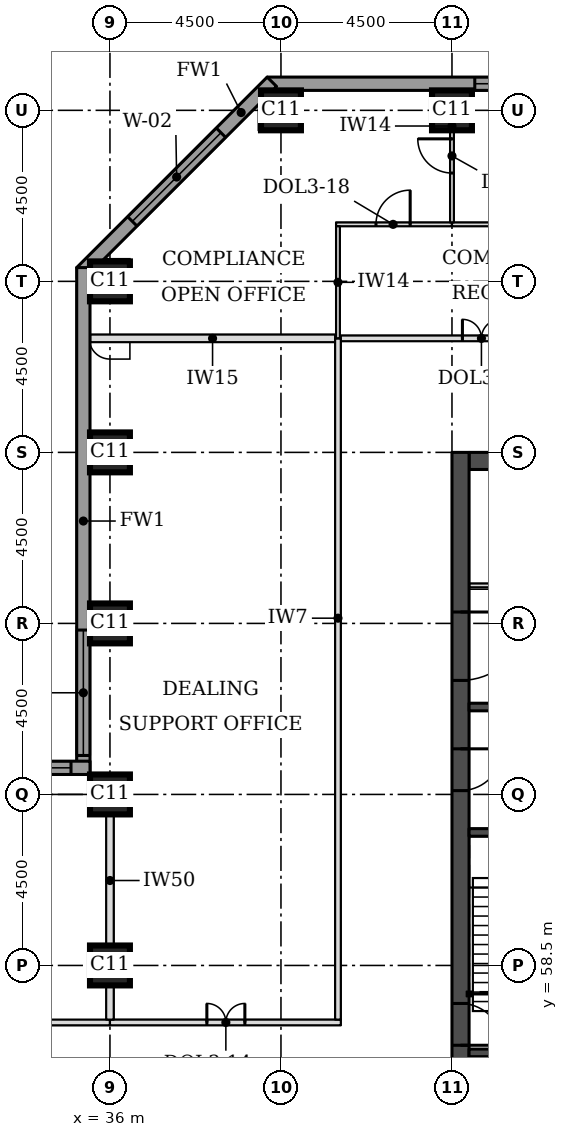
"""IFC4 building model, lengths in metres.
Left out: names, types, materials, properties, quantities, classifications, styles, units other than length and angle.
Written with IfcOpenShell. Run it as: python <this file> out.ifc"""

import sys

from ifc_helpers import new_model, si_unit, direction, frame, frame_2d, origin, origin_2d, place, context, subcontext, project, spatial, rectangle, extrude, element, fill, save


model = new_model("IFC4")
c1 = context("Model", 3, precision=1e-05, world=origin(), true_north=direction((0.0, 1.0)))
c2 = subcontext(c1, "Body", "Model", "MODEL_VIEW")
j1 = project(units=[si_unit("LENGTHUNIT", "METRE"), si_unit("PLANEANGLEUNIT", "RADIAN")], contexts=[c1])
p1 = place(None, origin())
s1 = spatial("IfcSite", under=j1, at=p1, CompositionType="ELEMENT")
p2 = place(p1, origin())
s2 = spatial("IfcBuilding", under=s1, at=p2, CompositionType="ELEMENT")
p3 = place(p2, frame((0.0, 0.0, 97.4)))
s3 = spatial("IfcBuildingStorey", under=s2, at=p3, CompositionType="ELEMENT", Elevation=97.4)
for number, where, z_axis, x_axis in (
    (1, (36.0, 58.5, 0.0), (0.0, 0.0, 1.0), (1.0, 0.0, 0.0)),
    (2, (36.0, 63.0, 0.0), (0.0, 0.0, 1.0), (1.0, 0.0, 0.0)),
    (3, (36.0, 67.5, 0.0), (0.0, 0.0, 1.0), (1.0, 0.0, 0.0)),
    (4, (36.0, 72.0, 0.0), (0.0, 0.0, 1.0), (1.0, 0.0, 0.0)),
    (5, (36.0, 76.5, 0.0), (0.0, 0.0, 1.0), (1.0, 0.0, 0.0)),
    (6, (40.5, 81.0, 0.0), (0.0, 0.0, 1.0), (1.0, 0.0, 0.0)),
    (7, (45.0, 81.0, 0.0), (0.0, 0.0, 1.0), (1.0, 0.0, 0.0)),
):
    element("IfcColumn", number, at=place(p3, frame(where, z_axis=z_axis, x_axis=x_axis)), inside=s3, PredefinedType="COLUMN", context=c2, shape_type="SweptSolid", body=[
        extrude(rectangle(XDim=1.05, YDim=1.05, at=origin_2d()), origin(), (0.0, 0.0, 1.0), 3.7),
    ])
p4 = place(p3, frame((45.45, 71.775, 0.0), z_axis=(0.0, 0.0, 1.0), x_axis=(1.0, 0.0, 0.0)))
e8 = element("IfcWall", 8, at=p4, inside=s3, PredefinedType="SHEAR", context=c2, shape_type="SweptSolid", body=[
    extrude(rectangle(XDim=21.6, YDim=0.45, at=frame_2d((10.8, 0.0))), origin(), (0.0, 0.0, 1.0), 3.7),
])
p5 = place(p3, frame((45.225, 49.5, 0.0), z_axis=(0.0, 0.0, 1.0), x_axis=(0.0, 1.0, 0.0)))
e9 = element("IfcWall", 9, at=p5, inside=s3, PredefinedType="SHEAR", context=c2, shape_type="SweptSolid", body=[
    extrude(rectangle(XDim=22.5, YDim=0.45, at=frame_2d((11.25, 0.0))), origin(), (0.0, 0.0, 1.0), 3.7),
])
p6 = place(p5, frame((4.2, 0.0, 0.0)))
e10 = element("IfcOpeningElement", 10, at=p6, cuts=e9, PredefinedType="OPENING", context=c2, shape_type="SweptSolid", body=[
    extrude(rectangle(XDim=1.8, YDim=2.1, at=frame_2d((0.9, 1.05))), frame((0.0, 0.235, 0.0), z_axis=(0.0, -1.0, 0.0), x_axis=(1.0, 0.0, 0.0)), (0.0, 0.0, 1.0), 0.47),
])
p7 = place(p5, frame((6.9, 0.0, 0.0)))
e11 = element("IfcOpeningElement", 11, at=p7, cuts=e9, PredefinedType="OPENING", context=c2, shape_type="SweptSolid", body=[
    extrude(rectangle(XDim=1.1, YDim=2.1, at=frame_2d((0.55, 1.05))), frame((0.0, 0.235, 0.0), z_axis=(0.0, -1.0, 0.0), x_axis=(1.0, 0.0, 0.0)), (0.0, 0.0, 1.0), 0.47),
])
p8 = place(p5, frame((13.6, 0.0, 0.0)))
e12 = element("IfcOpeningElement", 12, at=p8, cuts=e9, PredefinedType="OPENING", context=c2, shape_type="SweptSolid", body=[
    extrude(rectangle(XDim=1.1, YDim=2.1, at=frame_2d((0.55, 1.05))), frame((0.0, 0.235, 0.0), z_axis=(0.0, -1.0, 0.0), x_axis=(1.0, 0.0, 0.0)), (0.0, 0.0, 1.0), 0.47),
])
p9 = place(p5, frame((16.5, 0.0, 0.0)))
e13 = element("IfcOpeningElement", 13, at=p9, cuts=e9, PredefinedType="OPENING", context=c2, shape_type="SweptSolid", body=[
    extrude(rectangle(XDim=1.8, YDim=2.1, at=frame_2d((0.9, 1.05))), frame((0.0, 0.235, 0.0), z_axis=(0.0, -1.0, 0.0), x_axis=(1.0, 0.0, 0.0)), (0.0, 0.0, 1.0), 0.47),
])
p10 = place(p3, frame((72.362, 81.7, 0.0), z_axis=(0.0, 0.0, 1.0), x_axis=(-1.0, 0.0, 0.0)))
e14 = element("IfcWall", 14, at=p10, inside=s3, PredefinedType="STANDARD", context=c2, shape_type="SweptSolid", body=[
    extrude(rectangle(XDim=32.225, YDim=0.35, at=frame_2d((16.112, 0.0))), origin(), (0.0, 0.0, 1.0), 3.525),
])
p11 = place(p10, frame((5.462, 0.0, 0.9)))
e15 = element("IfcOpeningElement", 15, at=p11, cuts=e14, PredefinedType="OPENING", context=c2, shape_type="SweptSolid", body=[
    extrude(rectangle(XDim=3.3, YDim=1.9, at=frame_2d((1.65, 0.95))), frame((0.0, 0.185, 0.0), z_axis=(0.0, -1.0, 0.0), x_axis=(1.0, 0.0, 0.0)), (0.0, 0.0, 1.0), 0.37),
])
p12 = place(p10, frame((9.962, 0.0, 0.9)))
e16 = element("IfcOpeningElement", 16, at=p12, cuts=e14, PredefinedType="OPENING", context=c2, shape_type="SweptSolid", body=[
    extrude(rectangle(XDim=3.3, YDim=1.9, at=frame_2d((1.65, 0.95))), frame((0.0, 0.185, 0.0), z_axis=(0.0, -1.0, 0.0), x_axis=(1.0, 0.0, 0.0)), (0.0, 0.0, 1.0), 0.37),
])
p13 = place(p10, frame((14.462, 0.0, 0.9)))
e17 = element("IfcOpeningElement", 17, at=p13, cuts=e14, PredefinedType="OPENING", context=c2, shape_type="SweptSolid", body=[
    extrude(rectangle(XDim=3.3, YDim=1.9, at=frame_2d((1.65, 0.95))), frame((0.0, 0.185, 0.0), z_axis=(0.0, -1.0, 0.0), x_axis=(1.0, 0.0, 0.0)), (0.0, 0.0, 1.0), 0.37),
])
p14 = place(p10, frame((18.962, 0.0, 0.9)))
e18 = element("IfcOpeningElement", 18, at=p14, cuts=e14, PredefinedType="OPENING", context=c2, shape_type="SweptSolid", body=[
    extrude(rectangle(XDim=3.3, YDim=1.9, at=frame_2d((1.65, 0.95))), frame((0.0, 0.185, 0.0), z_axis=(0.0, -1.0, 0.0), x_axis=(1.0, 0.0, 0.0)), (0.0, 0.0, 1.0), 0.37),
])
p15 = place(p10, frame((23.462, 0.0, 0.9)))
e19 = element("IfcOpeningElement", 19, at=p15, cuts=e14, PredefinedType="OPENING", context=c2, shape_type="SweptSolid", body=[
    extrude(rectangle(XDim=3.3, YDim=1.9, at=frame_2d((1.65, 0.95))), frame((0.0, 0.185, 0.0), z_axis=(0.0, -1.0, 0.0), x_axis=(1.0, 0.0, 0.0)), (0.0, 0.0, 1.0), 0.37),
])
p16 = place(p3, frame((40.261, 81.751, 0.0), z_axis=(0.0, 0.0, 1.0), x_axis=(-0.707106781187, -0.707106781187, 0.0)))
e20 = element("IfcWall", 20, at=p16, inside=s3, PredefinedType="STANDARD", context=c2, shape_type="SweptSolid", body=[
    extrude(rectangle(XDim=7.089, YDim=0.35, at=frame_2d((3.544, 0.0))), origin(), (0.0, 0.0, 1.0), 3.525),
])
p17 = place(p16, frame((1.894, 0.0, 0.9)))
e21 = element("IfcOpeningElement", 21, at=p17, cuts=e20, PredefinedType="OPENING", context=c2, shape_type="SweptSolid", body=[
    extrude(rectangle(XDim=3.3, YDim=1.9, at=frame_2d((1.65, 0.95))), frame((0.0, 0.185, 0.0), z_axis=(0.0, -1.0, 0.0), x_axis=(1.0, 0.0, 0.0)), (0.0, 0.0, 1.0), 0.37),
])
p18 = place(p3, frame((35.3, 76.862, 0.0), z_axis=(0.0, 0.0, 1.0), x_axis=(0.0, -1.0, 0.0)))
e22 = element("IfcWall", 22, at=p18, inside=s3, PredefinedType="STANDARD", context=c2, shape_type="SweptSolid", body=[
    extrude(rectangle(XDim=13.337, YDim=0.35, at=frame_2d((6.669, 0.0))), origin(), (0.0, 0.0, 1.0), 3.525),
])
p19 = place(p18, frame((9.537, 0.0, 0.9)))
e23 = element("IfcOpeningElement", 23, at=p19, cuts=e22, PredefinedType="OPENING", context=c2, shape_type="SweptSolid", body=[
    extrude(rectangle(XDim=3.3, YDim=1.9, at=frame_2d((1.65, 0.95))), frame((0.0, 0.185, 0.0), z_axis=(0.0, -1.0, 0.0), x_axis=(1.0, 0.0, 0.0)), (0.0, 0.0, 1.0), 0.37),
])
p20 = place(p3, frame((35.475, 63.7, 0.0), z_axis=(0.0, 0.0, 1.0), x_axis=(-1.0, 0.0, 0.0)))
e24 = element("IfcWall", 24, at=p20, inside=s3, PredefinedType="STANDARD", context=c2, shape_type="SweptSolid", body=[
    extrude(rectangle(XDim=17.837, YDim=0.35, at=frame_2d((8.919, 0.0))), origin(), (0.0, 0.0, 1.0), 3.525),
])
p21 = place(p20, frame((0.5, 0.0, 0.9)))
e25 = element("IfcOpeningElement", 25, at=p21, cuts=e24, PredefinedType="OPENING", context=c2, shape_type="SweptSolid", body=[
    extrude(rectangle(XDim=3.3, YDim=1.9, at=frame_2d((1.65, 0.95))), frame((0.0, 0.185, 0.0), z_axis=(0.0, -1.0, 0.0), x_axis=(1.0, 0.0, 0.0)), (0.0, 0.0, 1.0), 0.37),
])
p22 = place(p20, frame((9.075, 0.0, 0.9)))
e26 = element("IfcOpeningElement", 26, at=p22, cuts=e24, PredefinedType="OPENING", context=c2, shape_type="SweptSolid", body=[
    extrude(rectangle(XDim=3.3, YDim=1.9, at=frame_2d((1.65, 0.95))), frame((0.0, 0.185, 0.0), z_axis=(0.0, -1.0, 0.0), x_axis=(1.0, 0.0, 0.0)), (0.0, 0.0, 1.0), 0.37),
])
p23 = place(p3, frame((29.38, 57.0, 0.0), z_axis=(0.0, 0.0, 1.0), x_axis=(1.0, 0.0, 0.0)))
e27 = element("IfcWall", 27, at=p23, inside=s3, PredefinedType="PARTITIONING", context=c2, shape_type="SweptSolid", body=[
    extrude(rectangle(XDim=6.62, YDim=0.15, at=frame_2d((3.31, 0.0))), origin(), (0.0, 0.0, 1.0), 3.55),
])
p24 = place(p23, frame((2.88, 0.0, 0.0)))
e28 = element("IfcOpeningElement", 28, at=p24, cuts=e27, PredefinedType="OPENING", context=c2, shape_type="SweptSolid", body=[
    extrude(rectangle(XDim=1.0, YDim=2.1, at=frame_2d((0.5, 1.05))), frame((0.0, 0.085, 0.0), z_axis=(0.0, -1.0, 0.0), x_axis=(1.0, 0.0, 0.0)), (0.0, 0.0, 1.0), 0.17),
])
p25 = place(p3, frame((36.0, 57.0, 0.0), z_axis=(0.0, 0.0, 1.0), x_axis=(1.0, 0.0, 0.0)))
e29 = element("IfcWall", 29, at=p25, inside=s3, PredefinedType="PARTITIONING", context=c2, shape_type="SweptSolid", body=[
    extrude(rectangle(XDim=6.075, YDim=0.15, at=frame_2d((3.038, 0.0))), origin(), (0.0, 0.0, 1.0), 3.55),
])
p26 = place(p25, frame((2.55, 0.0, 0.0)))
e30 = element("IfcOpeningElement", 30, at=p26, cuts=e29, PredefinedType="OPENING", context=c2, shape_type="SweptSolid", body=[
    extrude(rectangle(XDim=1.0, YDim=2.1, at=frame_2d((0.5, 1.05))), frame((0.0, 0.085, 0.0), z_axis=(0.0, -1.0, 0.0), x_axis=(1.0, 0.0, 0.0)), (0.0, 0.0, 1.0), 0.17),
])
p27 = place(p3, frame((35.475, 75.0, 0.0), z_axis=(0.0, 0.0, 1.0), x_axis=(1.0, 0.0, 0.0)))
e31 = element("IfcWall", 31, at=p27, inside=s3, PredefinedType="PARTITIONING", context=c2, shape_type="SweptSolid", body=[
    extrude(rectangle(XDim=6.45, YDim=0.2, at=frame_2d((3.225, 0.0))), origin(), (0.0, 0.0, 1.0), 3.55),
])
p28 = place(p3, frame((42.075, 75.0, 0.0), z_axis=(0.0, 0.0, 1.0), x_axis=(1.0, 0.0, 0.0)))
e32 = element("IfcWall", 32, at=p28, inside=s3, PredefinedType="PARTITIONING", context=c2, shape_type="SweptSolid", body=[
    extrude(rectangle(XDim=7.425, YDim=0.15, at=frame_2d((3.712, 0.0))), origin(), (0.0, 0.0, 1.0), 3.55),
])
p29 = place(p28, frame((3.2, 0.0, 0.0)))
e33 = element("IfcOpeningElement", 33, at=p29, cuts=e32, PredefinedType="OPENING", context=c2, shape_type="SweptSolid", body=[
    extrude(rectangle(XDim=1.0, YDim=2.1, at=frame_2d((0.5, 1.05))), frame((0.0, 0.085, 0.0), z_axis=(0.0, -1.0, 0.0), x_axis=(1.0, 0.0, 0.0)), (0.0, 0.0, 1.0), 0.17),
])
p30 = place(p3, frame((41.95, 78.0, 0.0), z_axis=(0.0, 0.0, 1.0), x_axis=(1.0, 0.0, 0.0)))
e34 = element("IfcWall", 34, at=p30, inside=s3, PredefinedType="PARTITIONING", context=c2, shape_type="SweptSolid", body=[
    extrude(rectangle(XDim=3.05, YDim=0.1, at=frame_2d((1.525, 0.0))), origin(), (0.0, 0.0, 1.0), 3.55),
])
p31 = place(p30, frame((1.05, 0.0, 0.0)))
e35 = element("IfcOpeningElement", 35, at=p31, cuts=e34, PredefinedType="OPENING", context=c2, shape_type="SweptSolid", body=[
    extrude(rectangle(XDim=0.9, YDim=2.1, at=frame_2d((0.45, 1.05))), frame((0.0, 0.06, 0.0), z_axis=(0.0, -1.0, 0.0), x_axis=(1.0, 0.0, 0.0)), (0.0, 0.0, 1.0), 0.12),
])
p32 = place(p3, frame((45.0, 78.0, 0.0), z_axis=(0.0, 0.0, 1.0), x_axis=(1.0, 0.0, 0.0)))
e36 = element("IfcWall", 36, at=p32, inside=s3, PredefinedType="PARTITIONING", context=c2, shape_type="SweptSolid", body=[
    extrude(rectangle(XDim=4.4, YDim=0.1, at=frame_2d((2.2, 0.0))), origin(), (0.0, 0.0, 1.0), 3.55),
])
p33 = place(p3, frame((36.0, 57.075, 0.0), z_axis=(0.0, 0.0, 1.0), x_axis=(0.0, 1.0, 0.0)))
e37 = element("IfcWall", 37, at=p33, inside=s3, PredefinedType="PARTITIONING", context=c2, shape_type="SweptSolid", body=[
    extrude(rectangle(XDim=0.9, YDim=0.2, at=frame_2d((0.45, 0.0))), origin(), (0.0, 0.0, 1.0), 2.8),
])
p34 = place(p3, frame((42.0, 57.075, 0.0), z_axis=(0.0, 0.0, 1.0), x_axis=(0.0, 1.0, 0.0)))
e38 = element("IfcWall", 38, at=p34, inside=s3, PredefinedType="PARTITIONING", context=c2, shape_type="SweptSolid", body=[
    extrude(rectangle(XDim=17.925, YDim=0.15, at=frame_2d((8.962, 0.0))), origin(), (0.0, 0.0, 1.0), 3.55),
])
p35 = place(p3, frame((36.0, 58.995, 0.0), z_axis=(0.0, 0.0, 1.0), x_axis=(0.0, 1.0, 0.0)))
e39 = element("IfcWall", 39, at=p35, inside=s3, PredefinedType="PARTITIONING", context=c2, shape_type="SweptSolid", body=[
    extrude(rectangle(XDim=3.48, YDim=0.2, at=frame_2d((1.74, 0.0))), origin(), (0.0, 0.0, 1.0), 2.8),
])
p36 = place(p3, frame((42.0, 75.0, 0.0), z_axis=(0.0, 0.0, 1.0), x_axis=(0.0, 1.0, 0.0)))
e40 = element("IfcWall", 40, at=p36, inside=s3, PredefinedType="PARTITIONING", context=c2, shape_type="SweptSolid", body=[
    extrude(rectangle(XDim=2.95, YDim=0.1, at=frame_2d((1.475, 0.0))), origin(), (0.0, 0.0, 1.0), 3.55),
])
p37 = place(p3, frame((45.0, 78.05, 0.0), z_axis=(0.0, 0.0, 1.0), x_axis=(0.0, 1.0, 0.0)))
e41 = element("IfcWall", 41, at=p37, inside=s3, PredefinedType="PARTITIONING", context=c2, shape_type="SweptSolid", body=[
    extrude(rectangle(XDim=3.475, YDim=0.1, at=frame_2d((1.737, 0.0))), origin(), (0.0, 0.0, 1.0), 3.55),
])
p38 = place(p37, frame((1.3, 0.0, 0.0)))
e42 = element("IfcOpeningElement", 42, at=p38, cuts=e41, PredefinedType="OPENING", context=c2, shape_type="SweptSolid", body=[
    extrude(rectangle(XDim=0.9, YDim=2.1, at=frame_2d((0.45, 1.05))), frame((0.0, 0.06, 0.0), z_axis=(0.0, -1.0, 0.0), x_axis=(1.0, 0.0, 0.0)), (0.0, 0.0, 1.0), 0.12),
])
p39 = place(p3, frame((45.45, 56.2, 0.0), z_axis=(0.0, 0.0, 1.0), x_axis=(1.0, 0.0, 0.0)))
e43 = element("IfcWall", 43, at=p39, inside=s3, PredefinedType="SOLIDWALL", context=c2, shape_type="SweptSolid", body=[
    extrude(rectangle(XDim=3.15, YDim=0.2, at=frame_2d((1.575, 0.0))), origin(), (0.0, 0.0, 1.0), 3.55),
])
p40 = place(p3, frame((45.45, 62.0, 0.0), z_axis=(0.0, 0.0, 1.0), x_axis=(1.0, 0.0, 0.0)))
e44 = element("IfcWall", 44, at=p40, inside=s3, PredefinedType="SOLIDWALL", context=c2, shape_type="SweptSolid", body=[
    extrude(rectangle(XDim=5.2, YDim=0.2, at=frame_2d((2.6, 0.0))), origin(), (0.0, 0.0, 1.0), 3.55),
])
p41 = place(p3, frame((45.45, 65.3, 0.0), z_axis=(0.0, 0.0, 1.0), x_axis=(1.0, 0.0, 0.0)))
e45 = element("IfcWall", 45, at=p41, inside=s3, PredefinedType="SOLIDWALL", context=c2, shape_type="SweptSolid", body=[
    extrude(rectangle(XDim=2.35, YDim=0.2, at=frame_2d((1.175, 0.0))), origin(), (0.0, 0.0, 1.0), 3.55),
])
p42 = place(p3, frame((45.45, 68.5, 0.0), z_axis=(0.0, 0.0, 1.0), x_axis=(1.0, 0.0, 0.0)))
e46 = element("IfcWall", 46, at=p42, inside=s3, PredefinedType="PARTITIONING", context=c2, shape_type="SweptSolid", body=[
    extrude(rectangle(XDim=5.2, YDim=0.1, at=frame_2d((2.6, 0.0))), origin(), (0.0, 0.0, 1.0), 3.55),
])
p43 = place(p42, frame((0.59, 0.0, 0.0)))
e47 = element("IfcOpeningElement", 47, at=p43, cuts=e46, PredefinedType="OPENING", context=c2, shape_type="SweptSolid", body=[
    extrude(rectangle(XDim=0.9, YDim=2.1, at=frame_2d((0.45, 1.05))), frame((0.0, 0.06, 0.0), z_axis=(0.0, -1.0, 0.0), x_axis=(1.0, 0.0, 0.0)), (0.0, 0.0, 1.0), 0.12),
])
p44 = place(p42, frame((3.19, 0.0, 0.0)))
e48 = element("IfcOpeningElement", 48, at=p44, cuts=e46, PredefinedType="OPENING", context=c2, shape_type="SweptSolid", body=[
    extrude(rectangle(XDim=0.9, YDim=2.1, at=frame_2d((0.45, 1.05))), frame((0.0, 0.06, 0.0), z_axis=(0.0, -1.0, 0.0), x_axis=(1.0, 0.0, 0.0)), (0.0, 0.0, 1.0), 0.12),
])
p45 = place(p15, origin())
e49 = element("IfcWindow", 49, at=p45, inside=s3, PartitioningType="SINGLE_PANEL", PredefinedType="WINDOW", context=c2, shape_type="SweptSolid", body=[
    extrude(rectangle(XDim=3.3, YDim=1.9, at=frame_2d((1.65, 0.95))), frame((0.0, 0.085, 0.0), z_axis=(0.0, -1.0, 0.0), x_axis=(1.0, 0.0, 0.0)), (0.0, 0.0, 1.0), 0.06),
])
fill(e19, e49)
p46 = place(p17, origin())
e50 = element("IfcWindow", 50, at=p46, inside=s3, PartitioningType="SINGLE_PANEL", PredefinedType="WINDOW", context=c2, shape_type="SweptSolid", body=[
    extrude(rectangle(XDim=3.3, YDim=1.9, at=frame_2d((1.65, 0.95))), frame((0.0, 0.085, 0.0), z_axis=(0.0, -1.0, 0.0), x_axis=(1.0, 0.0, 0.0)), (0.0, 0.0, 1.0), 0.06),
])
fill(e21, e50)
p47 = place(p19, origin())
e51 = element("IfcWindow", 51, at=p47, inside=s3, PartitioningType="SINGLE_PANEL", PredefinedType="WINDOW", context=c2, shape_type="SweptSolid", body=[
    extrude(rectangle(XDim=3.3, YDim=1.9, at=frame_2d((1.65, 0.95))), frame((0.0, 0.085, 0.0), z_axis=(0.0, -1.0, 0.0), x_axis=(1.0, 0.0, 0.0)), (0.0, 0.0, 1.0), 0.06),
])
fill(e23, e51)
p48 = place(p21, origin())
e52 = element("IfcWindow", 52, at=p48, inside=s3, PartitioningType="SINGLE_PANEL", PredefinedType="WINDOW", context=c2, shape_type="SweptSolid", body=[
    extrude(rectangle(XDim=3.3, YDim=1.9, at=frame_2d((1.65, 0.95))), frame((0.0, 0.085, 0.0), z_axis=(0.0, -1.0, 0.0), x_axis=(1.0, 0.0, 0.0)), (0.0, 0.0, 1.0), 0.06),
])
fill(e25, e52)
p49 = place(p29, origin())
e53 = element("IfcDoor", 53, at=p49, inside=s3, OperationType="DOUBLE_DOOR_SINGLE_SWING", PredefinedType="DOOR", context=c2, shape_type="SweptSolid", body=[
    extrude(rectangle(XDim=1.0, YDim=2.1, at=frame_2d((0.5, 1.05))), frame((0.0, 0.025, 0.0), z_axis=(0.0, -1.0, 0.0), x_axis=(1.0, 0.0, 0.0)), (0.0, 0.0, 1.0), 0.05),
])
fill(e33, e53)
p50 = place(p31, origin())
e54 = element("IfcDoor", 54, at=p50, inside=s3, OperationType="SINGLE_SWING_RIGHT", PredefinedType="DOOR", context=c2, shape_type="SweptSolid", body=[
    extrude(rectangle(XDim=0.9, YDim=2.1, at=frame_2d((0.45, 1.05))), frame((0.0, 0.025, 0.0), z_axis=(0.0, -1.0, 0.0), x_axis=(1.0, 0.0, 0.0)), (0.0, 0.0, 1.0), 0.05),
])
fill(e35, e54)
p51 = place(p38, origin())
e55 = element("IfcDoor", 55, at=p51, inside=s3, OperationType="SINGLE_SWING_RIGHT", PredefinedType="DOOR", context=c2, shape_type="SweptSolid", body=[
    extrude(rectangle(XDim=0.9, YDim=2.1, at=frame_2d((0.45, 1.05))), frame((0.0, 0.025, 0.0), z_axis=(0.0, -1.0, 0.0), x_axis=(1.0, 0.0, 0.0)), (0.0, 0.0, 1.0), 0.05),
])
fill(e42, e55)
p52 = place(p26, origin())
e56 = element("IfcDoor", 56, at=p52, inside=s3, OperationType="DOUBLE_DOOR_SINGLE_SWING", PredefinedType="DOOR", context=c2, shape_type="SweptSolid", body=[
    extrude(rectangle(XDim=1.0, YDim=2.1, at=frame_2d((0.5, 1.05))), frame((0.0, 0.025, 0.0), z_axis=(0.0, -1.0, 0.0), x_axis=(1.0, 0.0, 0.0)), (0.0, 0.0, 1.0), 0.05),
])
fill(e30, e56)
p53 = place(p7, frame((1.1, 0.0, 0.0), z_axis=(0.0, 0.0, 1.0), x_axis=(-1.0, 0.0, 0.0)))
e57 = element("IfcDoor", 57, at=p53, inside=s3, OperationType="SINGLE_SWING_RIGHT", PredefinedType="DOOR", context=c2, shape_type="SweptSolid", body=[
    extrude(rectangle(XDim=1.1, YDim=2.1, at=frame_2d((0.55, 1.05))), frame((0.0, 0.025, 0.0), z_axis=(0.0, -1.0, 0.0), x_axis=(1.0, 0.0, 0.0)), (0.0, 0.0, 1.0), 0.05),
])
fill(e11, e57)
p54 = place(p8, frame((1.1, 0.0, 0.0), z_axis=(0.0, 0.0, 1.0), x_axis=(-1.0, 0.0, 0.0)))
e58 = element("IfcDoor", 58, at=p54, inside=s3, OperationType="SINGLE_SWING_LEFT", PredefinedType="DOOR", context=c2, shape_type="SweptSolid", body=[
    extrude(rectangle(XDim=1.1, YDim=2.1, at=frame_2d((0.55, 1.05))), frame((0.0, 0.025, 0.0), z_axis=(0.0, -1.0, 0.0), x_axis=(1.0, 0.0, 0.0)), (0.0, 0.0, 1.0), 0.05),
])
fill(e12, e58)
p55 = place(p9, frame((1.8, 0.0, 0.0), z_axis=(0.0, 0.0, 1.0), x_axis=(-1.0, 0.0, 0.0)))
e59 = element("IfcDoor", 59, at=p55, inside=s3, OperationType="SINGLE_SWING_LEFT", PredefinedType="DOOR", context=c2, shape_type="SweptSolid", body=[
    extrude(rectangle(XDim=1.8, YDim=2.1, at=frame_2d((0.9, 1.05))), frame((0.0, 0.025, 0.0), z_axis=(0.0, -1.0, 0.0), x_axis=(1.0, 0.0, 0.0)), (0.0, 0.0, 1.0), 0.05),
])
fill(e13, e59)
save(model, sys.argv[1])
